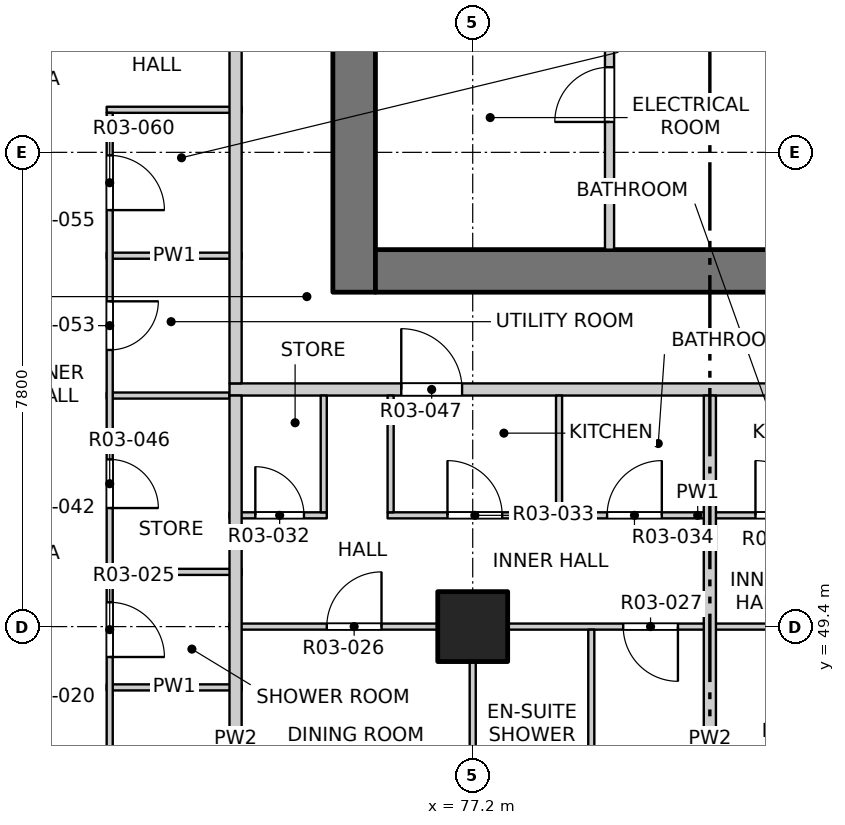
"""IFC4 building model, lengths in metres.
Left out: names, types, materials, properties, quantities, classifications, styles, units other than length and angle.
Written with IfcOpenShell. Run it as: python <this file> out.ifc"""

import sys

from ifc_helpers import new_model, si_unit, direction, frame, frame_2d, origin, origin_2d, place, context, subcontext, project, spatial, rectangle, extrude, element, fill, save


model = new_model("IFC4")
c1 = context("Model", 3, precision=1e-05, world=origin(), true_north=direction((0.0, 1.0)))
c2 = subcontext(c1, "Body", "Model", "MODEL_VIEW")
j1 = project(units=[si_unit("LENGTHUNIT", "METRE"), si_unit("PLANEANGLEUNIT", "RADIAN")], contexts=[c1])
p1 = place(None, origin())
s1 = spatial("IfcSite", under=j1, at=p1, CompositionType="ELEMENT")
p2 = place(p1, origin())
s2 = spatial("IfcBuilding", under=s1, at=p2, CompositionType="ELEMENT")
p3 = place(p2, frame((0.0, 0.0, 39.9)))
s3 = spatial("IfcBuildingStorey", under=s2, at=p3, CompositionType="ELEMENT", Elevation=39.9)
p4 = place(p3, frame((77.2, 49.4, -0.25), z_axis=(0.0, 0.0, 1.0), x_axis=(1.0, 0.0, 0.0)))
e1 = element("IfcColumn", 1, at=p4, inside=s3, PredefinedType="COLUMN", context=c2, shape_type="SweptSolid", body=[
    extrude(rectangle(XDim=1.15, YDim=1.15, at=origin_2d()), origin(), (0.0, 0.0, 1.0), 3.4),
])
p5 = place(p3, frame((75.25, 54.9, -0.25), z_axis=(0.0, 0.0, 1.0), x_axis=(0.0, 1.0, 0.0)))
e2 = element("IfcWall", 2, at=p5, inside=s3, PredefinedType="SOLIDWALL", context=c2, shape_type="SweptSolid", body=[
    extrude(rectangle(XDim=22.4, YDim=0.7, at=frame_2d((11.2, 0.0))), origin(), (0.0, 0.0, 1.0), 3.4),
])
p6 = place(p5, frame((7.55, 0.0, 0.25)))
e3 = element("IfcOpeningElement", 3, at=p6, cuts=e2, PredefinedType="OPENING", context=c2, shape_type="SweptSolid", body=[
    extrude(rectangle(XDim=0.9, YDim=2.1, at=frame_2d((0.45, 1.05))), frame((0.0, 0.36, 0.0), z_axis=(0.0, -1.0, 0.0), x_axis=(1.0, 0.0, 0.0)), (0.0, 0.0, 1.0), 0.72),
])
p7 = place(p5, frame((12.2, 0.0, 0.25)))
e4 = element("IfcOpeningElement", 4, at=p7, cuts=e2, PredefinedType="OPENING", context=c2, shape_type="SweptSolid", body=[
    extrude(rectangle(XDim=0.9, YDim=2.1, at=frame_2d((0.45, 1.05))), frame((0.0, 0.36, 0.0), z_axis=(0.0, -1.0, 0.0), x_axis=(1.0, 0.0, 0.0)), (0.0, 0.0, 1.0), 0.72),
])
p8 = place(p5, frame((16.7, 0.0, 0.25)))
e5 = element("IfcOpeningElement", 5, at=p8, cuts=e2, PredefinedType="OPENING", context=c2, shape_type="SweptSolid", body=[
    extrude(rectangle(XDim=0.9, YDim=2.1, at=frame_2d((0.45, 1.05))), frame((0.0, 0.36, 0.0), z_axis=(0.0, -1.0, 0.0), x_axis=(1.0, 0.0, 0.0)), (0.0, 0.0, 1.0), 0.72),
])
p9 = place(p5, frame((20.15, 0.0, 0.25)))
e6 = element("IfcOpeningElement", 6, at=p9, cuts=e2, PredefinedType="OPENING", context=c2, shape_type="SweptSolid", body=[
    extrude(rectangle(XDim=0.9, YDim=2.1, at=frame_2d((0.45, 1.05))), frame((0.0, 0.36, 0.0), z_axis=(0.0, -1.0, 0.0), x_axis=(1.0, 0.0, 0.0)), (0.0, 0.0, 1.0), 0.72),
])
p10 = place(p3, frame((75.6, 55.25, -0.25), z_axis=(0.0, 0.0, 1.0), x_axis=(1.0, 0.0, 0.0)))
e7 = element("IfcWall", 7, at=p10, inside=s3, PredefinedType="SOLIDWALL", context=c2, shape_type="SweptSolid", body=[
    extrude(rectangle(XDim=18.8, YDim=0.7, at=frame_2d((9.4, 0.0))), origin(), (0.0, 0.0, 1.0), 3.4),
])
p11 = place(p10, frame((8.65, 0.0, 0.25)))
e8 = element("IfcOpeningElement", 8, at=p11, cuts=e7, PredefinedType="OPENING", context=c2, shape_type="SweptSolid", body=[
    extrude(rectangle(XDim=1.5, YDim=2.1, at=frame_2d((0.75, 1.05))), frame((0.0, 0.36, 0.0), z_axis=(0.0, -1.0, 0.0), x_axis=(1.0, 0.0, 0.0)), (0.0, 0.0, 1.0), 0.72),
])
p12 = place(p3, frame((71.18, 48.4, 0.0), z_axis=(0.0, 0.0, 1.0), x_axis=(1.0, 0.0, 0.0)))
e9 = element("IfcWall", 9, at=p12, inside=s3, PredefinedType="PARTITIONING", context=c2, shape_type="SweptSolid", body=[
    extrude(rectangle(XDim=2.22, YDim=0.1, at=frame_2d((1.11, 0.0))), origin(), (0.0, 0.0, 1.0), 3.15),
])
p13 = place(p3, frame((73.2, 49.4, 0.0), z_axis=(0.0, 0.0, 1.0), x_axis=(1.0, 0.0, 0.0)))
e10 = element("IfcWall", 10, at=p13, inside=s3, PredefinedType="PARTITIONING", context=c2, shape_type="SweptSolid", body=[
    extrude(rectangle(XDim=23.6, YDim=0.1, at=frame_2d((11.8, 0.0))), origin(), (0.0, 0.0, 1.0), 3.15),
])
p14 = place(p13, frame((1.6, 0.0, 0.0)))
e11 = element("IfcOpeningElement", 11, at=p14, cuts=e10, PredefinedType="OPENING", context=c2, shape_type="SweptSolid", body=[
    extrude(rectangle(XDim=0.9, YDim=2.1, at=frame_2d((0.45, 1.05))), frame((0.0, 0.06, 0.0), z_axis=(0.0, -1.0, 0.0), x_axis=(1.0, 0.0, 0.0)), (0.0, 0.0, 1.0), 0.12),
])
p15 = place(p13, frame((6.475, 0.0, 0.0)))
e12 = element("IfcOpeningElement", 12, at=p15, cuts=e10, PredefinedType="OPENING", context=c2, shape_type="SweptSolid", body=[
    extrude(rectangle(XDim=0.9, YDim=2.1, at=frame_2d((0.45, 1.05))), frame((0.0, 0.06, 0.0), z_axis=(0.0, -1.0, 0.0), x_axis=(1.0, 0.0, 0.0)), (0.0, 0.0, 1.0), 0.12),
])
p16 = place(p13, frame((9.4, 0.0, 0.0)))
e13 = element("IfcOpeningElement", 13, at=p16, cuts=e10, PredefinedType="OPENING", context=c2, shape_type="SweptSolid", body=[
    extrude(rectangle(XDim=0.9, YDim=2.1, at=frame_2d((0.45, 1.05))), frame((0.0, 0.06, 0.0), z_axis=(0.0, -1.0, 0.0), x_axis=(1.0, 0.0, 0.0)), (0.0, 0.0, 1.0), 0.12),
])
p17 = place(p13, frame((14.275, 0.0, 0.0)))
e14 = element("IfcOpeningElement", 14, at=p17, cuts=e10, PredefinedType="OPENING", context=c2, shape_type="SweptSolid", body=[
    extrude(rectangle(XDim=0.9, YDim=2.1, at=frame_2d((0.45, 1.05))), frame((0.0, 0.06, 0.0), z_axis=(0.0, -1.0, 0.0), x_axis=(1.0, 0.0, 0.0)), (0.0, 0.0, 1.0), 0.12),
])
p18 = place(p13, frame((18.0, 0.0, 0.0)))
e15 = element("IfcOpeningElement", 15, at=p18, cuts=e10, PredefinedType="OPENING", context=c2, shape_type="SweptSolid", body=[
    extrude(rectangle(XDim=0.9, YDim=2.1, at=frame_2d((0.45, 1.05))), frame((0.0, 0.06, 0.0), z_axis=(0.0, -1.0, 0.0), x_axis=(1.0, 0.0, 0.0)), (0.0, 0.0, 1.0), 0.12),
])
p19 = place(p13, frame((21.1, 0.0, 0.0)))
e16 = element("IfcOpeningElement", 16, at=p19, cuts=e10, PredefinedType="OPENING", context=c2, shape_type="SweptSolid", body=[
    extrude(rectangle(XDim=0.9, YDim=2.1, at=frame_2d((0.45, 1.05))), frame((0.0, 0.06, 0.0), z_axis=(0.0, -1.0, 0.0), x_axis=(1.0, 0.0, 0.0)), (0.0, 0.0, 1.0), 0.12),
])
p20 = place(p3, frame((71.18, 50.3, 0.0), z_axis=(0.0, 0.0, 1.0), x_axis=(1.0, 0.0, 0.0)))
e17 = element("IfcWall", 17, at=p20, inside=s3, PredefinedType="PARTITIONING", context=c2, shape_type="SweptSolid", body=[
    extrude(rectangle(XDim=2.22, YDim=0.1, at=frame_2d((1.11, 0.0))), origin(), (0.0, 0.0, 1.0), 3.15),
])
p21 = place(p3, frame((73.2, 51.23, 0.0), z_axis=(0.0, 0.0, 1.0), x_axis=(1.0, 0.0, 0.0)))
e18 = element("IfcWall", 18, at=p21, inside=s3, PredefinedType="PARTITIONING", context=c2, shape_type="SweptSolid", body=[
    extrude(rectangle(XDim=1.6, YDim=0.1, at=frame_2d((0.8, 0.0))), origin(), (0.0, 0.0, 1.0), 3.15),
])
p22 = place(p21, frame((0.425, 0.0, 0.0)))
e19 = element("IfcOpeningElement", 19, at=p22, cuts=e18, PredefinedType="OPENING", context=c2, shape_type="SweptSolid", body=[
    extrude(rectangle(XDim=0.8, YDim=2.1, at=frame_2d((0.4, 1.05))), frame((0.0, 0.06, 0.0), z_axis=(0.0, -1.0, 0.0), x_axis=(1.0, 0.0, 0.0)), (0.0, 0.0, 1.0), 0.12),
])
p23 = place(p3, frame((75.8, 51.23, 0.0), z_axis=(0.0, 0.0, 1.0), x_axis=(1.0, 0.0, 0.0)))
e20 = element("IfcWall", 20, at=p23, inside=s3, PredefinedType="PARTITIONING", context=c2, shape_type="SweptSolid", body=[
    extrude(rectangle(XDim=10.2, YDim=0.1, at=frame_2d((5.1, 0.0))), origin(), (0.0, 0.0, 1.0), 3.15),
])
p24 = place(p23, frame((0.985, 0.0, 0.0)))
e21 = element("IfcOpeningElement", 21, at=p24, cuts=e20, PredefinedType="OPENING", context=c2, shape_type="SweptSolid", body=[
    extrude(rectangle(XDim=0.9, YDim=2.1, at=frame_2d((0.45, 1.05))), frame((0.0, 0.06, 0.0), z_axis=(0.0, -1.0, 0.0), x_axis=(1.0, 0.0, 0.0)), (0.0, 0.0, 1.0), 0.12),
])
p25 = place(p23, frame((3.61, 0.0, 0.0)))
e22 = element("IfcOpeningElement", 22, at=p25, cuts=e20, PredefinedType="OPENING", context=c2, shape_type="SweptSolid", body=[
    extrude(rectangle(XDim=0.9, YDim=2.1, at=frame_2d((0.45, 1.05))), frame((0.0, 0.06, 0.0), z_axis=(0.0, -1.0, 0.0), x_axis=(1.0, 0.0, 0.0)), (0.0, 0.0, 1.0), 0.12),
])
p26 = place(p23, frame((6.05, 0.0, 0.0)))
e23 = element("IfcOpeningElement", 23, at=p26, cuts=e20, PredefinedType="OPENING", context=c2, shape_type="SweptSolid", body=[
    extrude(rectangle(XDim=0.9, YDim=2.1, at=frame_2d((0.45, 1.05))), frame((0.0, 0.06, 0.0), z_axis=(0.0, -1.0, 0.0), x_axis=(1.0, 0.0, 0.0)), (0.0, 0.0, 1.0), 0.12),
])
p27 = place(p23, frame((8.525, 0.0, 0.0)))
e24 = element("IfcOpeningElement", 24, at=p27, cuts=e20, PredefinedType="OPENING", context=c2, shape_type="SweptSolid", body=[
    extrude(rectangle(XDim=0.8, YDim=2.1, at=frame_2d((0.4, 1.05))), frame((0.0, 0.06, 0.0), z_axis=(0.0, -1.0, 0.0), x_axis=(1.0, 0.0, 0.0)), (0.0, 0.0, 1.0), 0.12),
])
p28 = place(p3, frame((71.18, 53.2, 0.0), z_axis=(0.0, 0.0, 1.0), x_axis=(1.0, 0.0, 0.0)))
e25 = element("IfcWall", 25, at=p28, inside=s3, PredefinedType="PARTITIONING", context=c2, shape_type="SweptSolid", body=[
    extrude(rectangle(XDim=2.02, YDim=0.1, at=frame_2d((1.01, 0.0))), origin(), (0.0, 0.0, 1.0), 3.15),
])
p29 = place(p3, frame((73.2, 53.3, 0.0), z_axis=(0.0, 0.0, 1.0), x_axis=(1.0, 0.0, 0.0)))
e26 = element("IfcWall", 26, at=p29, inside=s3, PredefinedType="PARTITIONING", context=c2, shape_type="SweptSolid", body=[
    extrude(rectangle(XDim=23.6, YDim=0.2, at=frame_2d((11.8, 0.0))), origin(), (0.0, 0.0, 1.0), 3.15),
])
p30 = place(p29, frame((2.825, 0.0, 0.0)))
e27 = element("IfcOpeningElement", 27, at=p30, cuts=e26, PredefinedType="OPENING", context=c2, shape_type="SweptSolid", body=[
    extrude(rectangle(XDim=1.0, YDim=2.1, at=frame_2d((0.5, 1.05))), frame((0.0, 0.11, 0.0), z_axis=(0.0, -1.0, 0.0), x_axis=(1.0, 0.0, 0.0)), (0.0, 0.0, 1.0), 0.22),
])
p31 = place(p29, frame((14.025, 0.0, 0.0)))
e28 = element("IfcOpeningElement", 28, at=p31, cuts=e26, PredefinedType="OPENING", context=c2, shape_type="SweptSolid", body=[
    extrude(rectangle(XDim=1.0, YDim=2.1, at=frame_2d((0.5, 1.05))), frame((0.0, 0.11, 0.0), z_axis=(0.0, -1.0, 0.0), x_axis=(1.0, 0.0, 0.0)), (0.0, 0.0, 1.0), 0.22),
])
p32 = place(p29, frame((21.975, 0.0, 0.0)))
e29 = element("IfcOpeningElement", 29, at=p32, cuts=e26, PredefinedType="OPENING", context=c2, shape_type="SweptSolid", body=[
    extrude(rectangle(XDim=1.0, YDim=2.1, at=frame_2d((0.5, 1.05))), frame((0.0, 0.11, 0.0), z_axis=(0.0, -1.0, 0.0), x_axis=(1.0, 0.0, 0.0)), (0.0, 0.0, 1.0), 0.22),
])
for number, where, z_axis, x_axis in (
    (30, (71.18, 55.5, 0.0), (0.0, 0.0, 1.0), (1.0, 0.0, 0.0)),
    (31, (71.18, 57.9, 0.0), (0.0, 0.0, 1.0), (1.0, 0.0, 0.0)),
):
    element("IfcWall", number, at=place(p3, frame(where, z_axis=z_axis, x_axis=x_axis)), inside=s3, PredefinedType="PARTITIONING", context=c2, shape_type="SweptSolid", body=[
        extrude(rectangle(XDim=2.22, YDim=0.1, at=frame_2d((1.11, 0.0))), origin(), (0.0, 0.0, 1.0), 3.15),
    ])
p33 = place(p3, frame((71.23, 45.55, 0.0), z_axis=(0.0, 0.0, 1.0), x_axis=(0.0, 1.0, 0.0)))
e32 = element("IfcWall", 32, at=p33, inside=s3, PredefinedType="PARTITIONING", context=c2, shape_type="SweptSolid", body=[
    extrude(rectangle(XDim=12.3, YDim=0.1, at=frame_2d((6.15, 0.0))), origin(), (0.0, 0.0, 1.0), 3.15),
])
p34 = place(p33, frame((1.0, 0.0, 0.0)))
e33 = element("IfcOpeningElement", 33, at=p34, cuts=e32, PredefinedType="OPENING", context=c2, shape_type="SweptSolid", body=[
    extrude(rectangle(XDim=0.8, YDim=2.1, at=frame_2d((0.4, 1.05))), frame((0.0, 0.06, 0.0), z_axis=(0.0, -1.0, 0.0), x_axis=(1.0, 0.0, 0.0)), (0.0, 0.0, 1.0), 0.12),
])
p35 = place(p33, frame((3.35, 0.0, 0.0)))
e34 = element("IfcOpeningElement", 34, at=p35, cuts=e32, PredefinedType="OPENING", context=c2, shape_type="SweptSolid", body=[
    extrude(rectangle(XDim=0.9, YDim=2.1, at=frame_2d((0.45, 1.05))), frame((0.0, 0.06, 0.0), z_axis=(0.0, -1.0, 0.0), x_axis=(1.0, 0.0, 0.0)), (0.0, 0.0, 1.0), 0.12),
])
p36 = place(p33, frame((5.8, 0.0, 0.0)))
e35 = element("IfcOpeningElement", 35, at=p36, cuts=e32, PredefinedType="OPENING", context=c2, shape_type="SweptSolid", body=[
    extrude(rectangle(XDim=0.8, YDim=2.1, at=frame_2d((0.4, 1.05))), frame((0.0, 0.06, 0.0), z_axis=(0.0, -1.0, 0.0), x_axis=(1.0, 0.0, 0.0)), (0.0, 0.0, 1.0), 0.12),
])
p37 = place(p33, frame((8.4, 0.0, 0.0)))
e36 = element("IfcOpeningElement", 36, at=p37, cuts=e32, PredefinedType="OPENING", context=c2, shape_type="SweptSolid", body=[
    extrude(rectangle(XDim=0.8, YDim=2.1, at=frame_2d((0.4, 1.05))), frame((0.0, 0.06, 0.0), z_axis=(0.0, -1.0, 0.0), x_axis=(1.0, 0.0, 0.0)), (0.0, 0.0, 1.0), 0.12),
])
p38 = place(p33, frame((10.7, 0.0, 0.0)))
e37 = element("IfcOpeningElement", 37, at=p38, cuts=e32, PredefinedType="OPENING", context=c2, shape_type="SweptSolid", body=[
    extrude(rectangle(XDim=0.9, YDim=2.1, at=frame_2d((0.45, 1.05))), frame((0.0, 0.06, 0.0), z_axis=(0.0, -1.0, 0.0), x_axis=(1.0, 0.0, 0.0)), (0.0, 0.0, 1.0), 0.12),
])
p39 = place(p3, frame((73.3, 41.9, 0.0), z_axis=(0.0, 0.0, 1.0), x_axis=(0.0, 1.0, 0.0)))
e38 = element("IfcWall", 38, at=p39, inside=s3, PredefinedType="PARTITIONING", context=c2, shape_type="SweptSolid", body=[
    extrude(rectangle(XDim=11.3, YDim=0.2, at=frame_2d((5.65, 0.0))), origin(), (0.0, 0.0, 1.0), 3.15),
])
p40 = place(p3, frame((73.3, 53.4, 0.0), z_axis=(0.0, 0.0, 1.0), x_axis=(0.0, 1.0, 0.0)))
e39 = element("IfcWall", 39, at=p40, inside=s3, PredefinedType="PARTITIONING", context=c2, shape_type="SweptSolid", body=[
    extrude(rectangle(XDim=31.0, YDim=0.2, at=frame_2d((15.5, 0.0))), origin(), (0.0, 0.0, 1.0), 3.15),
])
p41 = place(p40, frame((5.775, 0.0, 0.0)))
e40 = element("IfcOpeningElement", 40, at=p41, cuts=e39, PredefinedType="OPENING", context=c2, shape_type="SweptSolid", body=[
    extrude(rectangle(XDim=1.0, YDim=2.1, at=frame_2d((0.5, 1.05))), frame((0.0, 0.11, 0.0), z_axis=(0.0, -1.0, 0.0), x_axis=(1.0, 0.0, 0.0)), (0.0, 0.0, 1.0), 0.22),
])
p42 = place(p40, frame((10.875, 0.0, 0.0)))
e41 = element("IfcOpeningElement", 41, at=p42, cuts=e39, PredefinedType="OPENING", context=c2, shape_type="SweptSolid", body=[
    extrude(rectangle(XDim=1.0, YDim=2.1, at=frame_2d((0.5, 1.05))), frame((0.0, 0.11, 0.0), z_axis=(0.0, -1.0, 0.0), x_axis=(1.0, 0.0, 0.0)), (0.0, 0.0, 1.0), 0.22),
])
p43 = place(p40, frame((18.025, 0.0, 0.0)))
e42 = element("IfcOpeningElement", 42, at=p43, cuts=e39, PredefinedType="OPENING", context=c2, shape_type="SweptSolid", body=[
    extrude(rectangle(XDim=1.0, YDim=2.1, at=frame_2d((0.5, 1.05))), frame((0.0, 0.11, 0.0), z_axis=(0.0, -1.0, 0.0), x_axis=(1.0, 0.0, 0.0)), (0.0, 0.0, 1.0), 0.22),
])
p44 = place(p40, frame((27.725, 0.0, 0.0)))
e43 = element("IfcOpeningElement", 43, at=p44, cuts=e39, PredefinedType="OPENING", context=c2, shape_type="SweptSolid", body=[
    extrude(rectangle(XDim=1.0, YDim=2.1, at=frame_2d((0.5, 1.05))), frame((0.0, 0.11, 0.0), z_axis=(0.0, -1.0, 0.0), x_axis=(1.0, 0.0, 0.0)), (0.0, 0.0, 1.0), 0.22),
])
for number, where, z_axis, x_axis in (
    (44, (74.75, 51.28, 0.0), (0.0, 0.0, 1.0), (0.0, 1.0, 0.0)),
    (45, (75.85, 51.28, 0.0), (0.0, 0.0, 1.0), (0.0, 1.0, 0.0)),
):
    element("IfcWall", number, at=place(p3, frame(where, z_axis=z_axis, x_axis=x_axis)), inside=s3, PredefinedType="PARTITIONING", context=c2, shape_type="SweptSolid", body=[
        extrude(rectangle(XDim=1.92, YDim=0.1, at=frame_2d((0.96, 0.0))), origin(), (0.0, 0.0, 1.0), 3.15),
    ])
p45 = place(p3, frame((77.2, 41.9, 0.0), z_axis=(0.0, 0.0, 1.0), x_axis=(0.0, 1.0, 0.0)))
e46 = element("IfcWall", 46, at=p45, inside=s3, PredefinedType="PARTITIONING", context=c2, shape_type="SweptSolid", body=[
    extrude(rectangle(XDim=7.45, YDim=0.1, at=frame_2d((3.725, 0.0))), origin(), (0.0, 0.0, 1.0), 2.55),
])
p46 = place(p3, frame((78.62, 51.28, 0.0), z_axis=(0.0, 0.0, 1.0), x_axis=(0.0, 1.0, 0.0)))
e47 = element("IfcWall", 47, at=p46, inside=s3, PredefinedType="PARTITIONING", context=c2, shape_type="SweptSolid", body=[
    extrude(rectangle(XDim=1.92, YDim=0.1, at=frame_2d((0.96, 0.0))), origin(), (0.0, 0.0, 1.0), 3.15),
])
p47 = place(p3, frame((79.15, 45.85, 0.0), z_axis=(0.0, 0.0, 1.0), x_axis=(0.0, 1.0, 0.0)))
e48 = element("IfcWall", 48, at=p47, inside=s3, PredefinedType="PARTITIONING", context=c2, shape_type="SweptSolid", body=[
    extrude(rectangle(XDim=3.5, YDim=0.1, at=frame_2d((1.75, 0.0))), origin(), (0.0, 0.0, 1.0), 3.15),
])
p48 = place(p3, frame((79.45, 55.6, 0.0), z_axis=(0.0, 0.0, 1.0), x_axis=(0.0, 1.0, 0.0)))
e49 = element("IfcWall", 49, at=p48, inside=s3, PredefinedType="PARTITIONING", context=c2, shape_type="SweptSolid", body=[
    extrude(rectangle(XDim=5.3, YDim=0.15, at=frame_2d((2.65, 0.0))), origin(), (0.0, 0.0, 1.0), 3.15),
])
p49 = place(p48, frame((2.1, 0.0, 0.0)))
e50 = element("IfcOpeningElement", 50, at=p49, cuts=e49, PredefinedType="OPENING", context=c2, shape_type="SweptSolid", body=[
    extrude(rectangle(XDim=0.9, YDim=2.1, at=frame_2d((0.45, 1.05))), frame((0.0, 0.085, 0.0), z_axis=(0.0, -1.0, 0.0), x_axis=(1.0, 0.0, 0.0)), (0.0, 0.0, 1.0), 0.17),
])
p50 = place(p3, frame((81.1, 41.9, 0.0), z_axis=(0.0, 0.0, 1.0), x_axis=(0.0, 1.0, 0.0)))
e51 = element("IfcWall", 51, at=p50, inside=s3, PredefinedType="PARTITIONING", context=c2, shape_type="SweptSolid", body=[
    extrude(rectangle(XDim=11.3, YDim=0.2, at=frame_2d((5.65, 0.0))), origin(), (0.0, 0.0, 1.0), 3.15),
])
p51 = place(p35, origin())
e52 = element("IfcDoor", 52, at=p51, inside=s3, OperationType="SINGLE_SWING_RIGHT", PredefinedType="DOOR", context=c2, shape_type="SweptSolid", body=[
    extrude(rectangle(XDim=0.9, YDim=2.1, at=frame_2d((0.45, 1.05))), frame((0.0, 0.025, 0.0), z_axis=(0.0, -1.0, 0.0), x_axis=(1.0, 0.0, 0.0)), (0.0, 0.0, 1.0), 0.05),
])
fill(e34, e52)
p52 = place(p14, origin())
e53 = element("IfcDoor", 53, at=p52, inside=s3, OperationType="SINGLE_SWING_RIGHT", PredefinedType="DOOR", context=c2, shape_type="SweptSolid", body=[
    extrude(rectangle(XDim=0.9, YDim=2.1, at=frame_2d((0.45, 1.05))), frame((0.0, 0.025, 0.0), z_axis=(0.0, -1.0, 0.0), x_axis=(1.0, 0.0, 0.0)), (0.0, 0.0, 1.0), 0.05),
])
fill(e11, e53)
p53 = place(p15, origin())
e54 = element("IfcDoor", 54, at=p53, inside=s3, OperationType="SINGLE_SWING_LEFT", PredefinedType="DOOR", context=c2, shape_type="SweptSolid", body=[
    extrude(rectangle(XDim=0.9, YDim=2.1, at=frame_2d((0.45, 1.05))), frame((0.0, 0.025, 0.0), z_axis=(0.0, -1.0, 0.0), x_axis=(1.0, 0.0, 0.0)), (0.0, 0.0, 1.0), 0.05),
])
fill(e12, e54)
p54 = place(p22, origin())
e55 = element("IfcDoor", 55, at=p54, inside=s3, OperationType="SINGLE_SWING_LEFT", PredefinedType="DOOR", context=c2, shape_type="SweptSolid", body=[
    extrude(rectangle(XDim=0.8, YDim=2.1, at=frame_2d((0.4, 1.05))), frame((0.0, 0.025, 0.0), z_axis=(0.0, -1.0, 0.0), x_axis=(1.0, 0.0, 0.0)), (0.0, 0.0, 1.0), 0.05),
])
fill(e19, e55)
p55 = place(p24, origin())
e56 = element("IfcDoor", 56, at=p55, inside=s3, OperationType="SINGLE_SWING_LEFT", PredefinedType="DOOR", context=c2, shape_type="SweptSolid", body=[
    extrude(rectangle(XDim=0.9, YDim=2.1, at=frame_2d((0.45, 1.05))), frame((0.0, 0.025, 0.0), z_axis=(0.0, -1.0, 0.0), x_axis=(1.0, 0.0, 0.0)), (0.0, 0.0, 1.0), 0.05),
])
fill(e21, e56)
p56 = place(p25, origin())
e57 = element("IfcDoor", 57, at=p56, inside=s3, OperationType="SINGLE_SWING_RIGHT", PredefinedType="DOOR", context=c2, shape_type="SweptSolid", body=[
    extrude(rectangle(XDim=0.9, YDim=2.1, at=frame_2d((0.45, 1.05))), frame((0.0, 0.025, 0.0), z_axis=(0.0, -1.0, 0.0), x_axis=(1.0, 0.0, 0.0)), (0.0, 0.0, 1.0), 0.05),
])
fill(e22, e57)
p57 = place(p26, origin())
e58 = element("IfcDoor", 58, at=p57, inside=s3, OperationType="SINGLE_SWING_LEFT", PredefinedType="DOOR", context=c2, shape_type="SweptSolid", body=[
    extrude(rectangle(XDim=0.9, YDim=2.1, at=frame_2d((0.45, 1.05))), frame((0.0, 0.025, 0.0), z_axis=(0.0, -1.0, 0.0), x_axis=(1.0, 0.0, 0.0)), (0.0, 0.0, 1.0), 0.05),
])
fill(e23, e58)
p58 = place(p36, origin())
e59 = element("IfcDoor", 59, at=p58, inside=s3, OperationType="SINGLE_SWING_RIGHT", PredefinedType="DOOR", context=c2, shape_type="SweptSolid", body=[
    extrude(rectangle(XDim=0.8, YDim=2.1, at=frame_2d((0.4, 1.05))), frame((0.0, 0.025, 0.0), z_axis=(0.0, -1.0, 0.0), x_axis=(1.0, 0.0, 0.0)), (0.0, 0.0, 1.0), 0.05),
])
fill(e35, e59)
p59 = place(p30, origin())
e60 = element("IfcDoor", 60, at=p59, inside=s3, OperationType="SINGLE_SWING_LEFT", PredefinedType="DOOR", context=c2, shape_type="SweptSolid", body=[
    extrude(rectangle(XDim=1.0, YDim=2.1, at=frame_2d((0.5, 1.05))), frame((0.0, 0.025, 0.0), z_axis=(0.0, -1.0, 0.0), x_axis=(1.0, 0.0, 0.0)), (0.0, 0.0, 1.0), 0.05),
])
fill(e27, e60)
p60 = place(p37, origin())
e61 = element("IfcDoor", 61, at=p60, inside=s3, OperationType="SINGLE_SWING_LEFT", PredefinedType="DOOR", context=c2, shape_type="SweptSolid", body=[
    extrude(rectangle(XDim=0.8, YDim=2.1, at=frame_2d((0.4, 1.05))), frame((0.0, 0.025, 0.0), z_axis=(0.0, -1.0, 0.0), x_axis=(1.0, 0.0, 0.0)), (0.0, 0.0, 1.0), 0.05),
])
fill(e36, e61)
p61 = place(p38, origin())
e62 = element("IfcDoor", 62, at=p61, inside=s3, OperationType="SINGLE_SWING_RIGHT", PredefinedType="DOOR", context=c2, shape_type="SweptSolid", body=[
    extrude(rectangle(XDim=0.9, YDim=2.1, at=frame_2d((0.45, 1.05))), frame((0.0, 0.025, 0.0), z_axis=(0.0, -1.0, 0.0), x_axis=(1.0, 0.0, 0.0)), (0.0, 0.0, 1.0), 0.05),
])
fill(e37, e62)
p62 = place(p49, origin())
e63 = element("IfcDoor", 63, at=p62, inside=s3, OperationType="SINGLE_SWING_LEFT", PredefinedType="DOOR", context=c2, shape_type="SweptSolid", body=[
    extrude(rectangle(XDim=0.9, YDim=2.1, at=frame_2d((0.45, 1.05))), frame((0.0, 0.025, 0.0), z_axis=(0.0, -1.0, 0.0), x_axis=(1.0, 0.0, 0.0)), (0.0, 0.0, 1.0), 0.05),
])
fill(e50, e63)
save(model, sys.argv[1])
